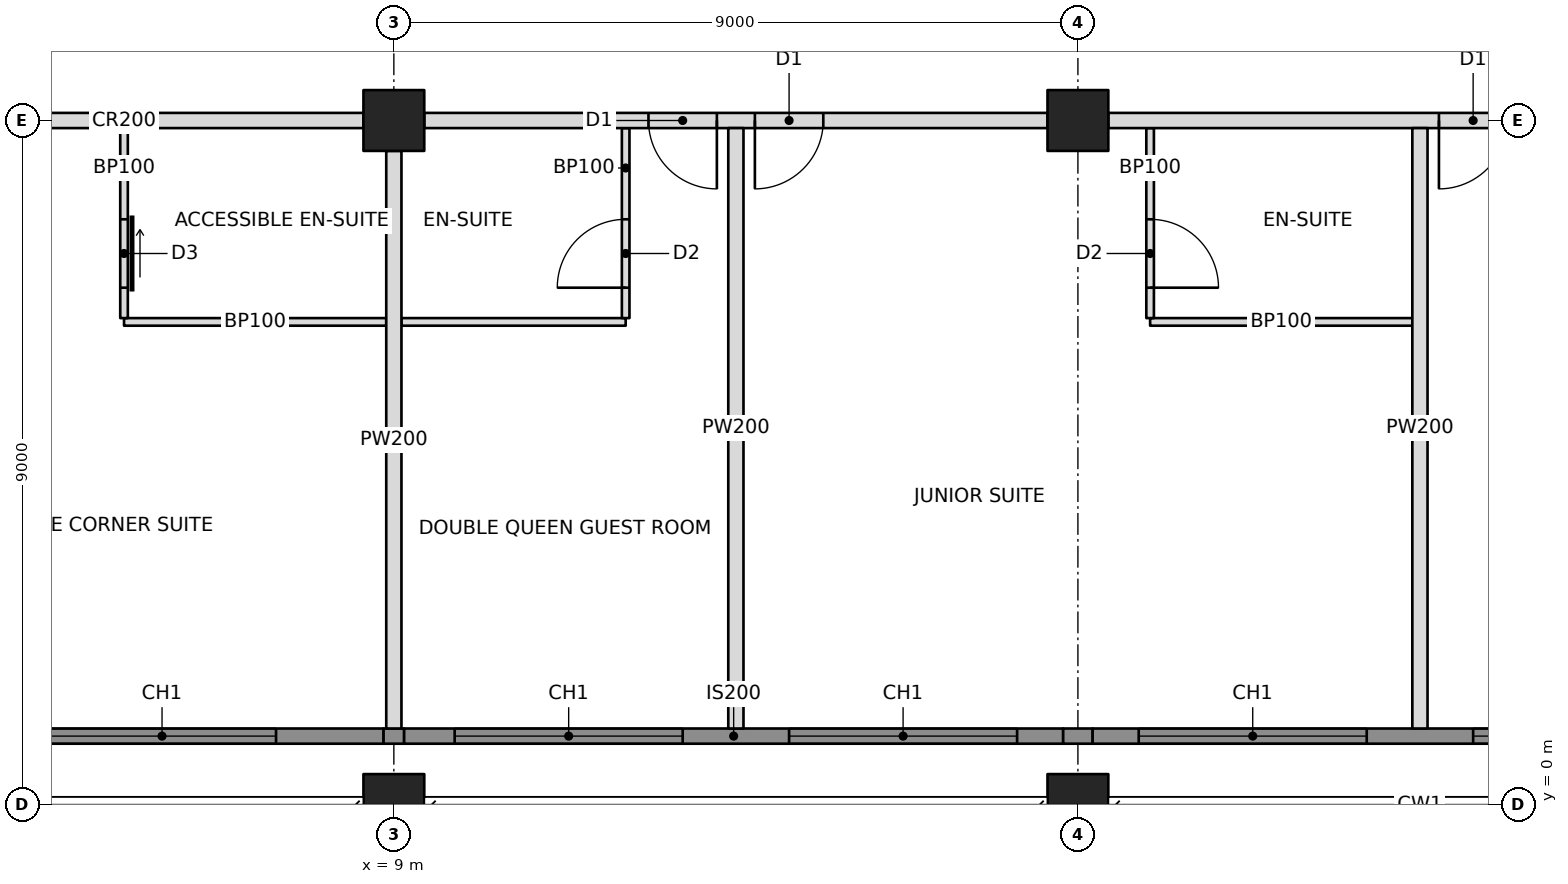
"""IFC4 building model, lengths in metres.
Left out: names, types, materials, properties, quantities, classifications, styles, units other than length and angle.
Written with IfcOpenShell. Run it as: python <this file> out.ifc"""

import sys

from ifc_helpers import new_model, si_unit, direction, frame, frame_2d, origin, origin_2d, place, context, subcontext, project, spatial, rectangle, hollow_rectangle, extrude, element, fill, save


model = new_model("IFC4")
c1 = context("Model", 3, precision=1e-05, world=origin(), true_north=direction((0.0, 1.0)))
c2 = subcontext(c1, "Body", "Model", "MODEL_VIEW")
j1 = project(units=[si_unit("LENGTHUNIT", "METRE"), si_unit("PLANEANGLEUNIT", "RADIAN")], contexts=[c1])
p1 = place(None, origin())
s1 = spatial("IfcSite", under=j1, at=p1, CompositionType="ELEMENT")
p2 = place(p1, origin())
s2 = spatial("IfcBuilding", under=s1, at=p2, CompositionType="ELEMENT")
p3 = place(p2, frame((0.0, 0.0, 208.0)))
s3 = spatial("IfcBuildingStorey", under=s2, at=p3, CompositionType="ELEMENT", Elevation=208.0)
p4 = place(p3, frame((9.0, 0.0, 0.0), z_axis=(0.0, 0.0, 1.0), x_axis=(1.0, 0.0, 0.0)))
e1 = element("IfcColumn", 1, at=p4, inside=s3, PredefinedType="COLUMN", context=c2, shape_type="SweptSolid", body=[
    extrude(hollow_rectangle(XDim=0.8, YDim=0.8, WallThickness=0.06, at=origin_2d()), origin(), (0.0, 0.0, 1.0), 3.4),
])
p5 = place(p3, frame((9.0, 9.0, 0.0), z_axis=(0.0, 0.0, 1.0), x_axis=(1.0, 0.0, 0.0)))
e2 = element("IfcColumn", 2, at=p5, inside=s3, PredefinedType="COLUMN", context=c2, shape_type="SweptSolid", body=[
    extrude(hollow_rectangle(XDim=0.8, YDim=0.8, WallThickness=0.05, at=origin_2d()), origin(), (0.0, 0.0, 1.0), 3.4),
])
p6 = place(p3, frame((18.0, 0.0, 0.0), z_axis=(0.0, 0.0, 1.0), x_axis=(1.0, 0.0, 0.0)))
e3 = element("IfcColumn", 3, at=p6, inside=s3, PredefinedType="COLUMN", context=c2, shape_type="SweptSolid", body=[
    extrude(hollow_rectangle(XDim=0.8, YDim=0.8, WallThickness=0.06, at=origin_2d()), origin(), (0.0, 0.0, 1.0), 3.4),
])
p7 = place(p3, frame((18.0, 9.0, 0.0), z_axis=(0.0, 0.0, 1.0), x_axis=(1.0, 0.0, 0.0)))
e4 = element("IfcColumn", 4, at=p7, inside=s3, PredefinedType="COLUMN", context=c2, shape_type="SweptSolid", body=[
    extrude(hollow_rectangle(XDim=0.8, YDim=0.8, WallThickness=0.05, at=origin_2d()), origin(), (0.0, 0.0, 1.0), 3.4),
])
p8 = place(p3, frame((3.0, 0.9, 0.0), z_axis=(0.0, 0.0, 1.0), x_axis=(1.0, 0.0, 0.0)))
e5 = element("IfcWall", 5, at=p8, inside=s3, PredefinedType="SOLIDWALL", context=c2, shape_type="SweptSolid", body=[
    extrude(rectangle(XDim=5.865, YDim=0.2, at=frame_2d((2.932, 0.0))), origin(), (0.0, 0.0, 1.0), 3.2),
])
p9 = place(p8, frame((1.45, 0.0, 0.6)))
e6 = element("IfcOpeningElement", 6, at=p9, cuts=e5, PredefinedType="OPENING", context=c2, shape_type="SweptSolid", body=[
    extrude(rectangle(XDim=3.0, YDim=2.2, at=frame_2d((1.5, 1.1))), frame((0.0, 0.11, 0.0), z_axis=(0.0, -1.0, 0.0), x_axis=(1.0, 0.0, 0.0)), (0.0, 0.0, 1.0), 0.22),
])
p10 = place(p3, frame((1.0, 9.0, 0.0), z_axis=(0.0, 0.0, 1.0), x_axis=(1.0, 0.0, 0.0)))
e7 = element("IfcWall", 7, at=p10, inside=s3, PredefinedType="PARTITIONING", context=c2, shape_type="SweptSolid", body=[
    extrude(rectangle(XDim=7.6, YDim=0.2, at=frame_2d((3.8, 0.0))), origin(), (0.0, 0.0, 1.0), 2.438),
])
p11 = place(p10, frame((0.25, 0.0, 0.0)))
e8 = element("IfcOpeningElement", 8, at=p11, cuts=e7, PredefinedType="OPENING", context=c2, shape_type="SweptSolid", body=[
    extrude(rectangle(XDim=0.9, YDim=2.1, at=frame_2d((0.45, 1.05))), frame((0.0, 0.11, 0.0), z_axis=(0.0, -1.0, 0.0), x_axis=(1.0, 0.0, 0.0)), (0.0, 0.0, 1.0), 0.22),
])
p12 = place(p3, frame((9.4, 9.0, 0.0), z_axis=(0.0, 0.0, 1.0), x_axis=(1.0, 0.0, 0.0)))
e9 = element("IfcWall", 9, at=p12, inside=s3, PredefinedType="PARTITIONING", context=c2, shape_type="SweptSolid", body=[
    extrude(rectangle(XDim=8.2, YDim=0.2, at=frame_2d((4.1, 0.0))), origin(), (0.0, 0.0, 1.0), 2.405),
])
p13 = place(p12, frame((2.95, 0.0, 0.0)))
e10 = element("IfcOpeningElement", 10, at=p13, cuts=e9, PredefinedType="OPENING", context=c2, shape_type="SweptSolid", body=[
    extrude(rectangle(XDim=0.9, YDim=2.1, at=frame_2d((0.45, 1.05))), frame((0.0, 0.11, 0.0), z_axis=(0.0, -1.0, 0.0), x_axis=(1.0, 0.0, 0.0)), (0.0, 0.0, 1.0), 0.22),
])
p14 = place(p12, frame((4.35, 0.0, 0.0)))
e11 = element("IfcOpeningElement", 11, at=p14, cuts=e9, PredefinedType="OPENING", context=c2, shape_type="SweptSolid", body=[
    extrude(rectangle(XDim=0.9, YDim=2.1, at=frame_2d((0.45, 1.05))), frame((0.0, 0.11, 0.0), z_axis=(0.0, -1.0, 0.0), x_axis=(1.0, 0.0, 0.0)), (0.0, 0.0, 1.0), 0.22),
])
p15 = place(p3, frame((18.4, 9.0, 0.0), z_axis=(0.0, 0.0, 1.0), x_axis=(1.0, 0.0, 0.0)))
e12 = element("IfcWall", 12, at=p15, inside=s3, PredefinedType="PARTITIONING", context=c2, shape_type="SweptSolid", body=[
    extrude(rectangle(XDim=8.2, YDim=0.2, at=frame_2d((4.1, 0.0))), origin(), (0.0, 0.0, 1.0), 2.405),
])
p16 = place(p15, frame((4.35, 0.0, 0.0)))
e13 = element("IfcOpeningElement", 13, at=p16, cuts=e12, PredefinedType="OPENING", context=c2, shape_type="SweptSolid", body=[
    extrude(rectangle(XDim=0.9, YDim=2.1, at=frame_2d((0.45, 1.05))), frame((0.0, 0.11, 0.0), z_axis=(0.0, -1.0, 0.0), x_axis=(1.0, 0.0, 0.0)), (0.0, 0.0, 1.0), 0.22),
])
p17 = place(p3, frame((9.0, 8.6, 0.0), z_axis=(0.0, 0.0, 1.0), x_axis=(0.0, -1.0, 0.0)))
e14 = element("IfcWall", 14, at=p17, inside=s3, PredefinedType="PARTITIONING", context=c2, shape_type="SweptSolid", body=[
    extrude(rectangle(XDim=7.6, YDim=0.2, at=frame_2d((3.8, 0.0))), origin(), (0.0, 0.0, 1.0), 2.438),
])
for number, where, z_axis, x_axis in (
    (15, (13.5, 8.9, 0.0), (0.0, 0.0, 1.0), (0.0, -1.0, 0.0)),
    (16, (22.5, 8.9, 0.0), (0.0, 0.0, 1.0), (0.0, -1.0, 0.0)),
):
    element("IfcWall", number, at=place(p3, frame(where, z_axis=z_axis, x_axis=x_axis)), inside=s3, PredefinedType="PARTITIONING", context=c2, shape_type="SweptSolid", body=[
        extrude(rectangle(XDim=7.9, YDim=0.2, at=frame_2d((3.95, 0.0))), origin(), (0.0, 0.0, 1.0), 2.404),
    ])
p18 = place(p3, frame((5.45, 6.35, 0.0), z_axis=(0.0, 0.0, 1.0), x_axis=(1.0, 0.0, 0.0)))
e17 = element("IfcWall", 17, at=p18, inside=s3, PredefinedType="PARTITIONING", context=c2, shape_type="SweptSolid", body=[
    extrude(rectangle(XDim=3.45, YDim=0.1, at=frame_2d((1.725, 0.0))), origin(), (0.0, 0.0, 1.0), 2.438),
])
p19 = place(p3, frame((5.45, 8.9, 0.0), z_axis=(0.0, 0.0, 1.0), x_axis=(0.0, -1.0, 0.0)))
e18 = element("IfcWall", 18, at=p19, inside=s3, PredefinedType="PARTITIONING", context=c2, shape_type="SweptSolid", body=[
    extrude(rectangle(XDim=2.5, YDim=0.1, at=frame_2d((1.25, 0.0))), origin(), (0.0, 0.0, 1.0), 2.438),
])
p20 = place(p19, frame((1.2, 0.0, 0.0)))
e19 = element("IfcOpeningElement", 19, at=p20, cuts=e18, PredefinedType="OPENING", context=c2, shape_type="SweptSolid", body=[
    extrude(rectangle(XDim=0.9, YDim=2.1, at=frame_2d((0.45, 1.05))), frame((0.0, 0.06, 0.0), z_axis=(0.0, -1.0, 0.0), x_axis=(1.0, 0.0, 0.0)), (0.0, 0.0, 1.0), 0.12),
])
p21 = place(p3, frame((9.1, 6.35, 0.0), z_axis=(0.0, 0.0, 1.0), x_axis=(1.0, 0.0, 0.0)))
e20 = element("IfcWall", 20, at=p21, inside=s3, PredefinedType="PARTITIONING", context=c2, shape_type="SweptSolid", body=[
    extrude(rectangle(XDim=2.95, YDim=0.1, at=frame_2d((1.475, 0.0))), origin(), (0.0, 0.0, 1.0), 2.438),
])
p22 = place(p3, frame((12.05, 8.9, 0.0), z_axis=(0.0, 0.0, 1.0), x_axis=(0.0, -1.0, 0.0)))
e21 = element("IfcWall", 21, at=p22, inside=s3, PredefinedType="PARTITIONING", context=c2, shape_type="SweptSolid", body=[
    extrude(rectangle(XDim=2.5, YDim=0.1, at=frame_2d((1.25, 0.0))), origin(), (0.0, 0.0, 1.0), 2.404),
])
p23 = place(p22, frame((1.2, 0.0, 0.0)))
e22 = element("IfcOpeningElement", 22, at=p23, cuts=e21, PredefinedType="OPENING", context=c2, shape_type="SweptSolid", body=[
    extrude(rectangle(XDim=0.9, YDim=2.1, at=frame_2d((0.45, 1.05))), frame((0.0, 0.06, 0.0), z_axis=(0.0, -1.0, 0.0), x_axis=(1.0, 0.0, 0.0)), (0.0, 0.0, 1.0), 0.12),
])
p24 = place(p3, frame((18.95, 6.35, 0.0), z_axis=(0.0, 0.0, 1.0), x_axis=(1.0, 0.0, 0.0)))
e23 = element("IfcWall", 23, at=p24, inside=s3, PredefinedType="PARTITIONING", context=c2, shape_type="SweptSolid", body=[
    extrude(rectangle(XDim=3.45, YDim=0.1, at=frame_2d((1.725, 0.0))), origin(), (0.0, 0.0, 1.0), 3.2),
])
p25 = place(p3, frame((18.95, 8.9, 0.0), z_axis=(0.0, 0.0, 1.0), x_axis=(0.0, -1.0, 0.0)))
e24 = element("IfcWall", 24, at=p25, inside=s3, PredefinedType="PARTITIONING", context=c2, shape_type="SweptSolid", body=[
    extrude(rectangle(XDim=2.5, YDim=0.1, at=frame_2d((1.25, 0.0))), origin(), (0.0, 0.0, 1.0), 2.404),
])
p26 = place(p25, frame((1.2, 0.0, 0.0)))
e25 = element("IfcOpeningElement", 25, at=p26, cuts=e24, PredefinedType="OPENING", context=c2, shape_type="SweptSolid", body=[
    extrude(rectangle(XDim=0.9, YDim=2.1, at=frame_2d((0.45, 1.05))), frame((0.0, 0.06, 0.0), z_axis=(0.0, -1.0, 0.0), x_axis=(1.0, 0.0, 0.0)), (0.0, 0.0, 1.0), 0.12),
])
p27 = place(p3, frame((8.865, 0.9, 0.0), z_axis=(0.0, 0.0, 1.0), x_axis=(1.0, 0.0, 0.0)))
e26 = element("IfcWall", 26, at=p27, inside=s3, PredefinedType="SOLIDWALL", context=c2, shape_type="SweptSolid", body=[
    extrude(rectangle(XDim=0.271, YDim=0.2, at=frame_2d((0.135, 0.0))), origin(), (0.0, 0.0, 1.0), 2.438),
])
p28 = place(p3, frame((9.135, 0.9, 0.0), z_axis=(0.0, 0.0, 1.0), x_axis=(1.0, 0.0, 0.0)))
e27 = element("IfcWall", 27, at=p28, inside=s3, PredefinedType="SOLIDWALL", context=c2, shape_type="SweptSolid", body=[
    extrude(rectangle(XDim=8.671, YDim=0.2, at=frame_2d((4.335, 0.0))), origin(), (0.0, 0.0, 1.0), 3.2),
])
p29 = place(p28, frame((0.665, 0.0, 0.6)))
e28 = element("IfcOpeningElement", 28, at=p29, cuts=e27, PredefinedType="OPENING", context=c2, shape_type="SweptSolid", body=[
    extrude(rectangle(XDim=3.0, YDim=2.2, at=frame_2d((1.5, 1.1))), frame((0.0, 0.11, 0.0), z_axis=(0.0, -1.0, 0.0), x_axis=(1.0, 0.0, 0.0)), (0.0, 0.0, 1.0), 0.22),
])
p30 = place(p28, frame((5.065, 0.0, 0.6)))
e29 = element("IfcOpeningElement", 29, at=p30, cuts=e27, PredefinedType="OPENING", context=c2, shape_type="SweptSolid", body=[
    extrude(rectangle(XDim=3.0, YDim=2.2, at=frame_2d((1.5, 1.1))), frame((0.0, 0.11, 0.0), z_axis=(0.0, -1.0, 0.0), x_axis=(1.0, 0.0, 0.0)), (0.0, 0.0, 1.0), 0.22),
])
p31 = place(p3, frame((17.806, 0.9, 0.0), z_axis=(0.0, 0.0, 1.0), x_axis=(1.0, 0.0, 0.0)))
e30 = element("IfcWall", 30, at=p31, inside=s3, PredefinedType="SOLIDWALL", context=c2, shape_type="SweptSolid", body=[
    extrude(rectangle(XDim=0.388, YDim=0.2, at=frame_2d((0.194, 0.0))), origin(), (0.0, 0.0, 1.0), 2.404),
])
p32 = place(p3, frame((18.194, 0.9, 0.0), z_axis=(0.0, 0.0, 1.0), x_axis=(1.0, 0.0, 0.0)))
e31 = element("IfcWall", 31, at=p32, inside=s3, PredefinedType="SOLIDWALL", context=c2, shape_type="SweptSolid", body=[
    extrude(rectangle(XDim=8.612, YDim=0.2, at=frame_2d((4.306, 0.0))), origin(), (0.0, 0.0, 1.0), 3.2),
])
p33 = place(p32, frame((0.606, 0.0, 0.6)))
e32 = element("IfcOpeningElement", 32, at=p33, cuts=e31, PredefinedType="OPENING", context=c2, shape_type="SweptSolid", body=[
    extrude(rectangle(XDim=3.0, YDim=2.2, at=frame_2d((1.5, 1.1))), frame((0.0, 0.11, 0.0), z_axis=(0.0, -1.0, 0.0), x_axis=(1.0, 0.0, 0.0)), (0.0, 0.0, 1.0), 0.22),
])
p34 = place(p32, frame((5.006, 0.0, 0.6)))
e33 = element("IfcOpeningElement", 33, at=p34, cuts=e31, PredefinedType="OPENING", context=c2, shape_type="SweptSolid", body=[
    extrude(rectangle(XDim=3.0, YDim=2.2, at=frame_2d((1.5, 1.1))), frame((0.0, 0.11, 0.0), z_axis=(0.0, -1.0, 0.0), x_axis=(1.0, 0.0, 0.0)), (0.0, 0.0, 1.0), 0.22),
])
p35 = place(p9, origin())
e34 = element("IfcWindow", 34, at=p35, inside=s3, PartitioningType="TRIPLE_PANEL_VERTICAL", PredefinedType="WINDOW", context=c2, shape_type="SweptSolid", body=[
    extrude(rectangle(XDim=3.0, YDim=2.2, at=frame_2d((1.5, 1.1))), frame((0.0, 0.03, 0.0), z_axis=(0.0, -1.0, 0.0), x_axis=(1.0, 0.0, 0.0)), (0.0, 0.0, 1.0), 0.06),
])
fill(e6, e34)
p36 = place(p29, origin())
e35 = element("IfcWindow", 35, at=p36, inside=s3, PartitioningType="TRIPLE_PANEL_VERTICAL", PredefinedType="WINDOW", context=c2, shape_type="SweptSolid", body=[
    extrude(rectangle(XDim=3.0, YDim=2.2, at=frame_2d((1.5, 1.1))), frame((0.0, 0.03, 0.0), z_axis=(0.0, -1.0, 0.0), x_axis=(1.0, 0.0, 0.0)), (0.0, 0.0, 1.0), 0.06),
])
fill(e28, e35)
p37 = place(p30, origin())
e36 = element("IfcWindow", 36, at=p37, inside=s3, PartitioningType="TRIPLE_PANEL_VERTICAL", PredefinedType="WINDOW", context=c2, shape_type="SweptSolid", body=[
    extrude(rectangle(XDim=3.0, YDim=2.2, at=frame_2d((1.5, 1.1))), frame((0.0, 0.03, 0.0), z_axis=(0.0, -1.0, 0.0), x_axis=(1.0, 0.0, 0.0)), (0.0, 0.0, 1.0), 0.06),
])
fill(e29, e36)
p38 = place(p33, origin())
e37 = element("IfcWindow", 37, at=p38, inside=s3, PartitioningType="TRIPLE_PANEL_VERTICAL", PredefinedType="WINDOW", context=c2, shape_type="SweptSolid", body=[
    extrude(rectangle(XDim=3.0, YDim=2.2, at=frame_2d((1.5, 1.1))), frame((0.0, 0.03, 0.0), z_axis=(0.0, -1.0, 0.0), x_axis=(1.0, 0.0, 0.0)), (0.0, 0.0, 1.0), 0.06),
])
fill(e32, e37)
p39 = place(p34, origin())
e38 = element("IfcWindow", 38, at=p39, inside=s3, PartitioningType="TRIPLE_PANEL_VERTICAL", PredefinedType="WINDOW", context=c2, shape_type="SweptSolid", body=[
    extrude(rectangle(XDim=3.0, YDim=2.2, at=frame_2d((1.5, 1.1))), frame((0.0, 0.03, 0.0), z_axis=(0.0, -1.0, 0.0), x_axis=(1.0, 0.0, 0.0)), (0.0, 0.0, 1.0), 0.06),
])
fill(e33, e38)
p40 = place(p20, origin())
e39 = element("IfcDoor", 39, at=p40, inside=s3, OperationType="SLIDING_TO_LEFT", PredefinedType="DOOR", context=c2, shape_type="SweptSolid", body=[
    extrude(rectangle(XDim=0.9, YDim=2.1, at=frame_2d((0.45, 1.05))), frame((0.0, 0.025, 0.0), z_axis=(0.0, -1.0, 0.0), x_axis=(1.0, 0.0, 0.0)), (0.0, 0.0, 1.0), 0.05),
])
fill(e19, e39)
p41 = place(p23, frame((0.9, 0.0, 0.0), z_axis=(0.0, 0.0, 1.0), x_axis=(-1.0, 0.0, 0.0)))
e40 = element("IfcDoor", 40, at=p41, inside=s3, OperationType="SINGLE_SWING_LEFT", PredefinedType="DOOR", context=c2, shape_type="SweptSolid", body=[
    extrude(rectangle(XDim=0.9, YDim=2.1, at=frame_2d((0.45, 1.05))), frame((0.0, 0.025, 0.0), z_axis=(0.0, -1.0, 0.0), x_axis=(1.0, 0.0, 0.0)), (0.0, 0.0, 1.0), 0.05),
])
fill(e22, e40)
p42 = place(p13, frame((0.9, 0.0, 0.0), z_axis=(0.0, 0.0, 1.0), x_axis=(-1.0, 0.0, 0.0)))
e41 = element("IfcDoor", 41, at=p42, inside=s3, OperationType="SINGLE_SWING_LEFT", PredefinedType="DOOR", context=c2, shape_type="SweptSolid", body=[
    extrude(rectangle(XDim=0.9, YDim=2.1, at=frame_2d((0.45, 1.05))), frame((0.0, 0.025, 0.0), z_axis=(0.0, -1.0, 0.0), x_axis=(1.0, 0.0, 0.0)), (0.0, 0.0, 1.0), 0.05),
])
fill(e10, e41)
p43 = place(p26, origin())
e42 = element("IfcDoor", 42, at=p43, inside=s3, OperationType="SINGLE_SWING_RIGHT", PredefinedType="DOOR", context=c2, shape_type="SweptSolid", body=[
    extrude(rectangle(XDim=0.9, YDim=2.1, at=frame_2d((0.45, 1.05))), frame((0.0, 0.025, 0.0), z_axis=(0.0, -1.0, 0.0), x_axis=(1.0, 0.0, 0.0)), (0.0, 0.0, 1.0), 0.05),
])
fill(e25, e42)
p44 = place(p14, frame((0.9, 0.0, 0.0), z_axis=(0.0, 0.0, 1.0), x_axis=(-1.0, 0.0, 0.0)))
e43 = element("IfcDoor", 43, at=p44, inside=s3, OperationType="SINGLE_SWING_RIGHT", PredefinedType="DOOR", context=c2, shape_type="SweptSolid", body=[
    extrude(rectangle(XDim=0.9, YDim=2.1, at=frame_2d((0.45, 1.05))), frame((0.0, 0.025, 0.0), z_axis=(0.0, -1.0, 0.0), x_axis=(1.0, 0.0, 0.0)), (0.0, 0.0, 1.0), 0.05),
])
fill(e11, e43)
p45 = place(p16, frame((0.9, 0.0, 0.0), z_axis=(0.0, 0.0, 1.0), x_axis=(-1.0, 0.0, 0.0)))
e44 = element("IfcDoor", 44, at=p45, inside=s3, OperationType="SINGLE_SWING_RIGHT", PredefinedType="DOOR", context=c2, shape_type="SweptSolid", body=[
    extrude(rectangle(XDim=0.9, YDim=2.1, at=frame_2d((0.45, 1.05))), frame((0.0, 0.025, 0.0), z_axis=(0.0, -1.0, 0.0), x_axis=(1.0, 0.0, 0.0)), (0.0, 0.0, 1.0), 0.05),
])
fill(e13, e44)
save(model, sys.argv[1])
